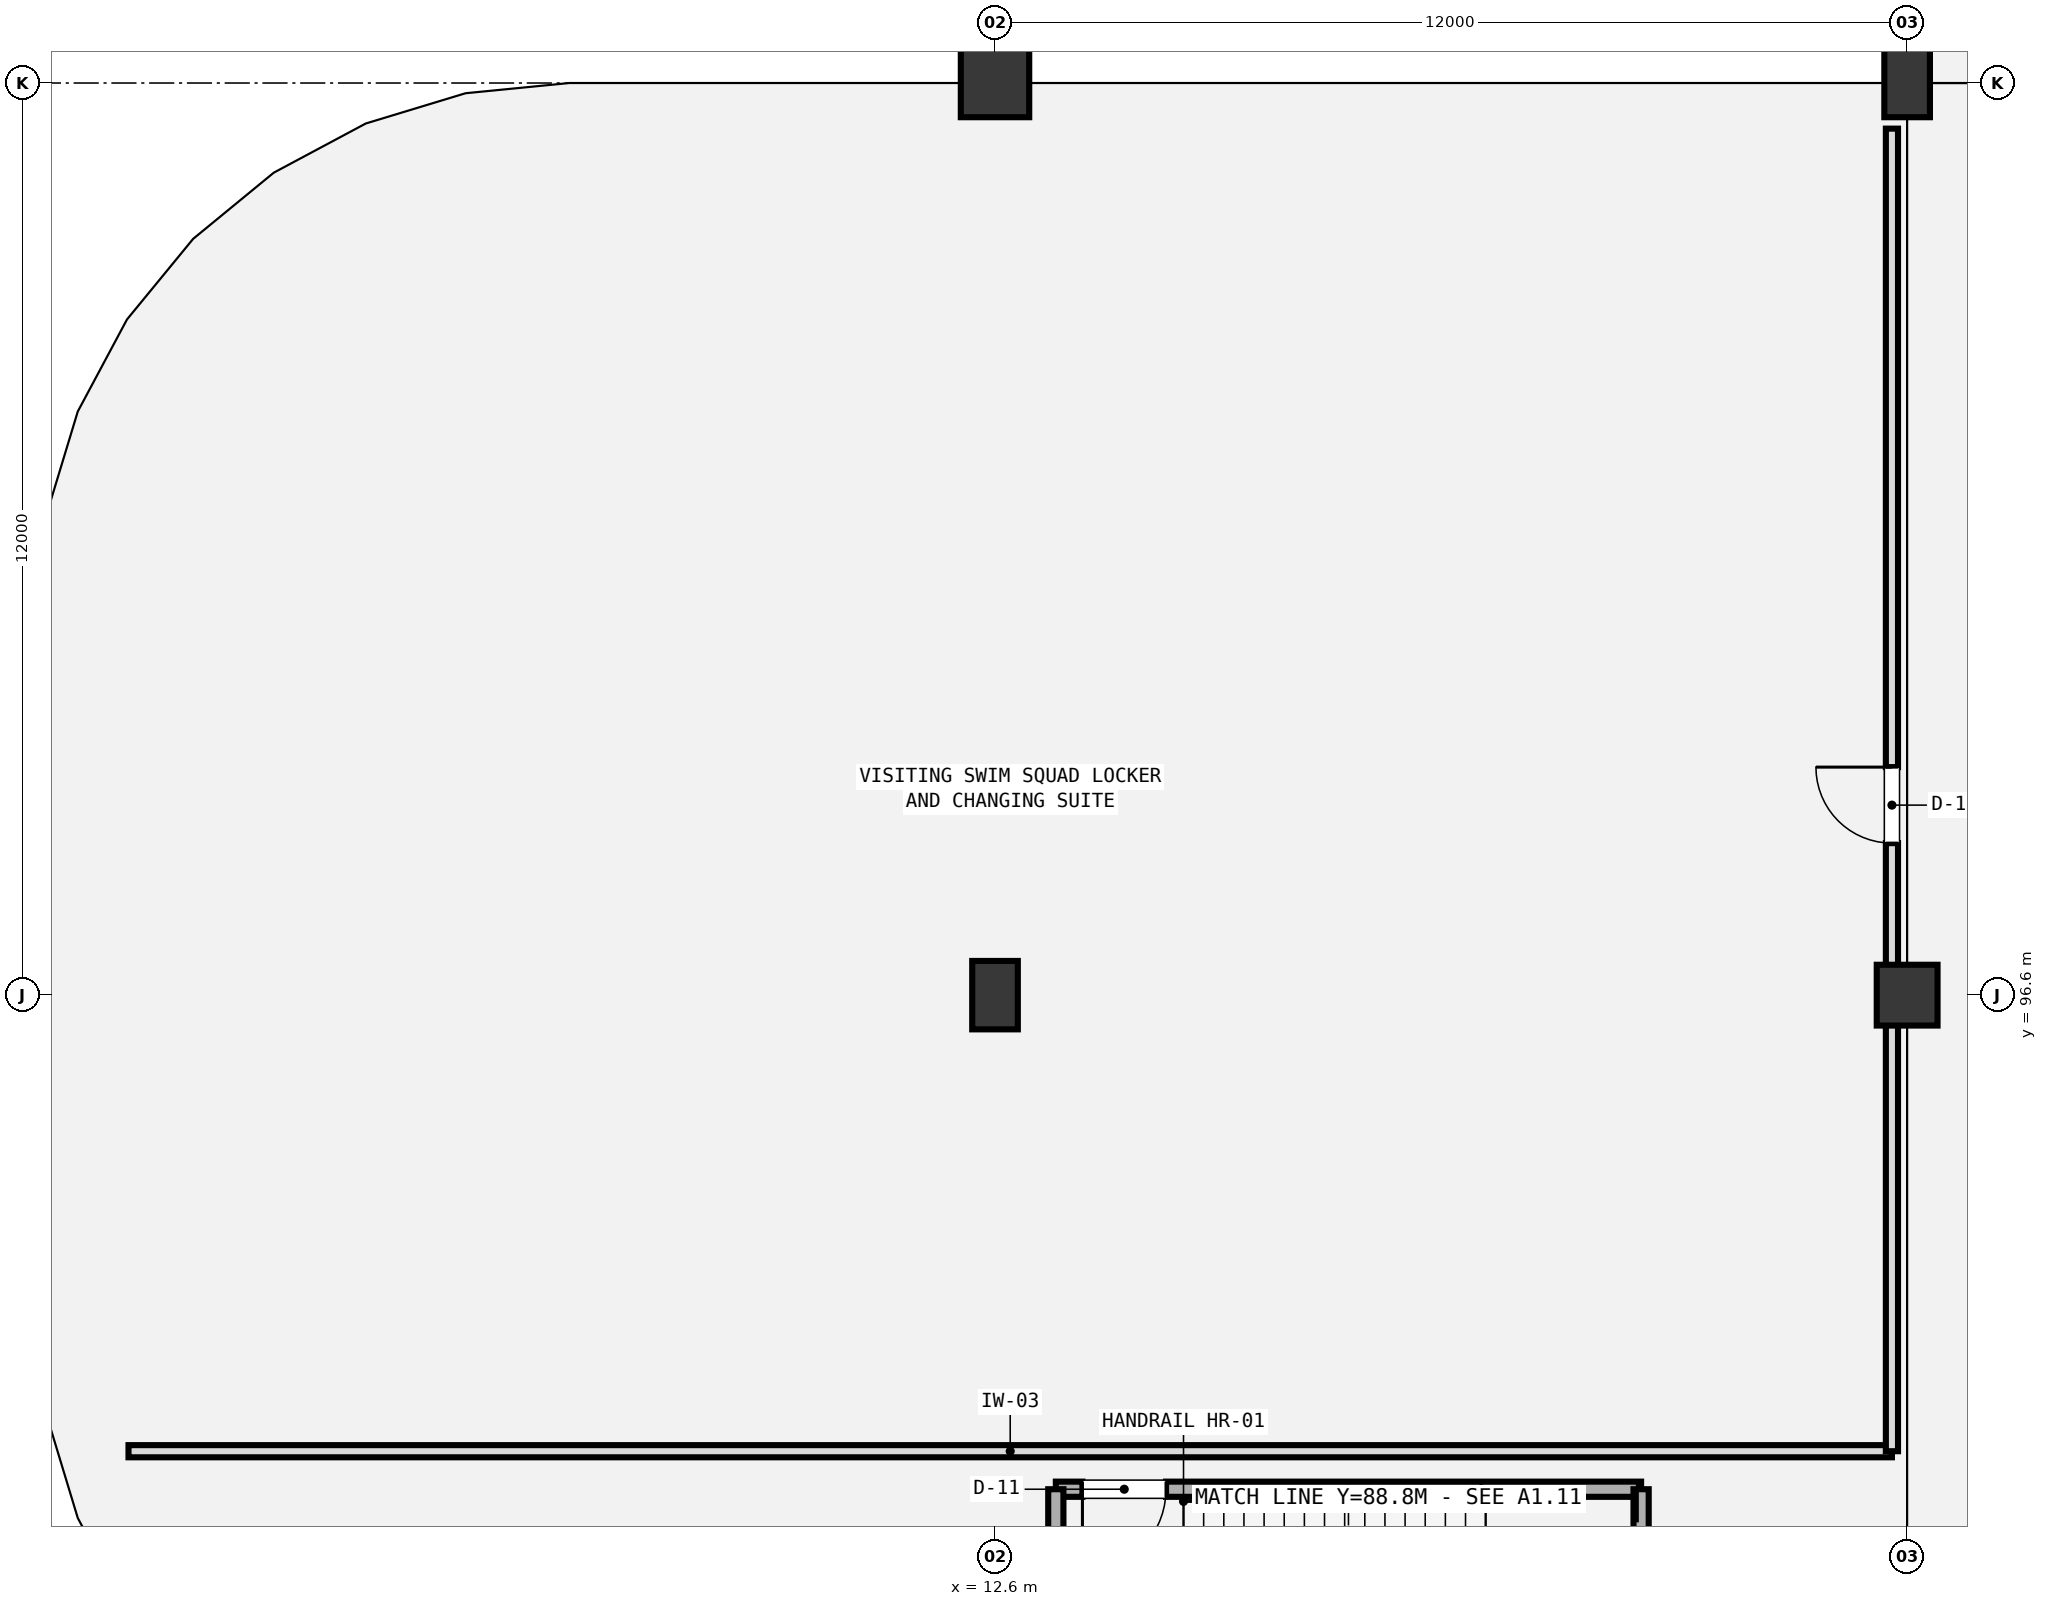
"""IFC4 building model, lengths in metres.
Left out: names, types, materials, properties, quantities, classifications, styles, units other than length and angle.
Written with IfcOpenShell. Run it as: python <this file> out.ifc"""

import sys

from ifc_helpers import new_model, si_unit, direction, frame, frame_2d, origin, origin_2d, place, context, subcontext, project, spatial, rectangle, extrude, element, fill, save


model = new_model("IFC4")
c1 = context("Model", 3, precision=1e-05, world=origin(), true_north=direction((0.0, 1.0)))
c2 = subcontext(c1, "Body", "Model", "MODEL_VIEW")
j1 = project(units=[si_unit("LENGTHUNIT", "METRE"), si_unit("PLANEANGLEUNIT", "RADIAN")], contexts=[c1])
p1 = place(None, origin())
s1 = spatial("IfcSite", under=j1, at=p1, CompositionType="ELEMENT")
p2 = place(p1, origin())
s2 = spatial("IfcBuilding", under=s1, at=p2, CompositionType="ELEMENT")
p3 = place(p2, frame((0.0, 0.0, -5.4)))
s3 = spatial("IfcBuildingStorey", under=s2, at=p3, CompositionType="ELEMENT", Elevation=-5.4)
p4 = place(p3, frame((12.6, 96.6, -0.55), z_axis=(0.0, 0.0, 1.0), x_axis=(1.0, 0.0, 0.0)))
e1 = element("IfcColumn", 1, at=p4, inside=s3, PredefinedType="COLUMN", context=c2, shape_type="SweptSolid", body=[
    extrude(rectangle(XDim=0.6, YDim=0.9, at=origin_2d()), origin(), (0.0, 0.0, 1.0), 5.95),
])
p5 = place(p3, frame((12.6, 108.6, -0.55), z_axis=(0.0, 0.0, 1.0), x_axis=(1.0, 0.0, 0.0)))
e2 = element("IfcColumn", 2, at=p5, inside=s3, PredefinedType="COLUMN", context=c2, shape_type="SweptSolid", body=[
    extrude(rectangle(XDim=0.9, YDim=0.9, at=origin_2d()), origin(), (0.0, 0.0, 1.0), 5.95),
])
p6 = place(p3, frame((24.6, 96.6, -0.55), z_axis=(0.0, 0.0, 1.0), x_axis=(1.0, 0.0, 0.0)))
e3 = element("IfcColumn", 3, at=p6, inside=s3, PredefinedType="COLUMN", context=c2, shape_type="SweptSolid", body=[
    extrude(rectangle(XDim=0.8, YDim=0.8, at=origin_2d()), origin(), (0.0, 0.0, 1.0), 5.95),
])
p7 = place(p3, frame((24.6, 108.6, -0.55), z_axis=(0.0, 0.0, 1.0), x_axis=(1.0, 0.0, 0.0)))
e4 = element("IfcColumn", 4, at=p7, inside=s3, PredefinedType="COLUMN", context=c2, shape_type="SweptSolid", body=[
    extrude(rectangle(XDim=0.6, YDim=0.9, at=origin_2d()), origin(), (0.0, 0.0, 1.0), 5.95),
])
p8 = place(p3, frame((24.6, 108.6, 0.0), z_axis=(0.0, 0.0, 1.0), x_axis=(0.0, 1.0, 0.0)))
e5 = element("IfcWall", 5, at=p8, inside=s3, PredefinedType="USERDEFINED", context=c2, shape_type="SweptSolid", body=[
    extrude(rectangle(XDim=27.4, YDim=0.5, at=frame_2d((13.7, 0.0))), origin(), (0.0, 0.0, 1.0), 4.38),
])
p9 = place(p3, frame((13.4, 90.1, -0.15), z_axis=(0.0, 0.0, 1.0), x_axis=(1.0, 0.0, 0.0)))
e6 = element("IfcWall", 6, at=p9, inside=s3, PredefinedType="SHEAR", context=c2, shape_type="SweptSolid", body=[
    extrude(rectangle(XDim=7.7, YDim=0.2, at=frame_2d((3.85, 0.0))), origin(), (0.0, 0.0, 1.0), 5.13),
])
p10 = place(p9, frame((0.35, 0.0, 0.15)))
e7 = element("IfcOpeningElement", 7, at=p10, cuts=e6, PredefinedType="OPENING", context=c2, shape_type="SweptSolid", body=[
    extrude(rectangle(XDim=1.1, YDim=2.2, at=frame_2d((0.55, 1.1))), frame((0.0, 0.11, 0.0), z_axis=(0.0, -1.0, 0.0), x_axis=(1.0, 0.0, 0.0)), (0.0, 0.0, 1.0), 0.22),
])
for number, where, z_axis, x_axis in (
    (8, (13.4, 85.94, -0.15), (0.0, 0.0, 1.0), (0.0, 1.0, 0.0)),
    (9, (21.1, 85.94, -0.15), (0.0, 0.0, 1.0), (0.0, 1.0, 0.0)),
):
    element("IfcWall", number, at=place(p3, frame(where, z_axis=z_axis, x_axis=x_axis)), inside=s3, PredefinedType="SHEAR", context=c2, shape_type="SweptSolid", body=[
        extrude(rectangle(XDim=4.16, YDim=0.2, at=frame_2d((2.08, 0.0))), origin(), (0.0, 0.0, 1.0), 5.13),
    ])
p11 = place(p3, frame((1.2, 90.6, 0.0), z_axis=(0.0, 0.0, 1.0), x_axis=(1.0, 0.0, 0.0)))
e10 = element("IfcWall", 10, at=p11, inside=s3, PredefinedType="PLUMBINGWALL", context=c2, shape_type="SweptSolid", body=[
    extrude(rectangle(XDim=23.2, YDim=0.16, at=frame_2d((11.6, 0.0))), origin(), (0.0, 0.0, 1.0), 3.8),
])
p12 = place(p3, frame((24.4, 90.6, 0.0), z_axis=(0.0, 0.0, 1.0), x_axis=(0.0, 1.0, 0.0)))
e11 = element("IfcWall", 11, at=p12, inside=s3, PredefinedType="PLUMBINGWALL", context=c2, shape_type="SweptSolid", body=[
    extrude(rectangle(XDim=17.4, YDim=0.16, at=frame_2d((8.7, 0.0))), origin(), (0.0, 0.0, 1.0), 3.8),
])
p13 = place(p12, frame((8.0, 0.0, 0.0)))
e12 = element("IfcOpeningElement", 12, at=p13, cuts=e11, PredefinedType="OPENING", context=c2, shape_type="SweptSolid", body=[
    extrude(rectangle(XDim=1.0, YDim=2.2, at=frame_2d((0.5, 1.1))), frame((0.0, 0.09, 0.0), z_axis=(0.0, -1.0, 0.0), x_axis=(1.0, 0.0, 0.0)), (0.0, 0.0, 1.0), 0.18),
])
p14 = place(p10, frame((1.1, 0.0, 0.0), z_axis=(0.0, 0.0, 1.0), x_axis=(-1.0, 0.0, 0.0)))
e13 = element("IfcDoor", 13, at=p14, inside=s3, OperationType="SINGLE_SWING_RIGHT", PredefinedType="DOOR", context=c2, shape_type="SweptSolid", body=[
    extrude(rectangle(XDim=1.1, YDim=2.2, at=frame_2d((0.55, 1.1))), frame((0.0, 0.025, 0.0), z_axis=(0.0, -1.0, 0.0), x_axis=(1.0, 0.0, 0.0)), (0.0, 0.0, 1.0), 0.05),
])
fill(e7, e13)
p15 = place(p13, origin())
e14 = element("IfcDoor", 14, at=p15, inside=s3, OperationType="SINGLE_SWING_RIGHT", PredefinedType="DOOR", context=c2, shape_type="SweptSolid", body=[
    extrude(rectangle(XDim=1.0, YDim=2.2, at=frame_2d((0.5, 1.1))), frame((0.0, 0.025, 0.0), z_axis=(0.0, -1.0, 0.0), x_axis=(1.0, 0.0, 0.0)), (0.0, 0.0, 1.0), 0.05),
])
fill(e12, e14)
save(model, sys.argv[1])
